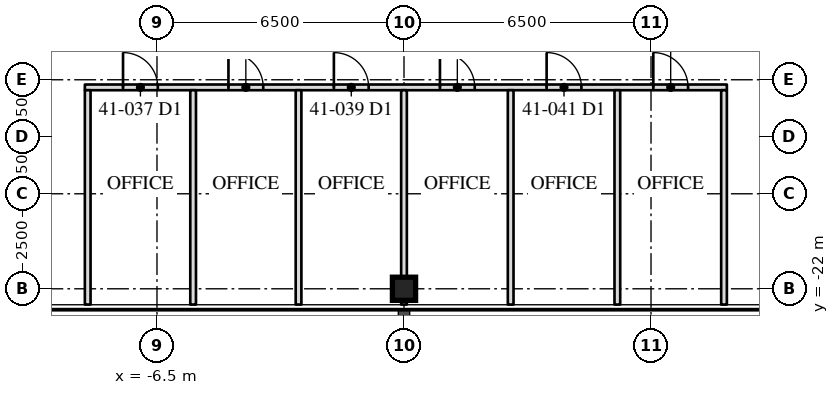
"""IFC4 building model, lengths in metres.
Left out: names, types, materials, properties, quantities, classifications, styles, units other than length and angle.
Written with IfcOpenShell. Run it as: python <this file> out.ifc"""

import sys

from ifc_helpers import new_model, si_unit, direction, frame, frame_2d, origin, origin_2d, place, context, subcontext, project, spatial, rectangle, hollow_rectangle, extrude, element, fill, save


model = new_model("IFC4")
c1 = context("Model", 3, precision=1e-05, world=origin(), true_north=direction((0.0, 1.0)))
c2 = subcontext(c1, "Body", "Model", "MODEL_VIEW")
j1 = project(units=[si_unit("LENGTHUNIT", "METRE"), si_unit("PLANEANGLEUNIT", "RADIAN")], contexts=[c1])
p1 = place(None, origin())
s1 = spatial("IfcSite", under=j1, at=p1, CompositionType="ELEMENT")
p2 = place(p1, origin())
s2 = spatial("IfcBuilding", under=s1, at=p2, CompositionType="ELEMENT")
p3 = place(p2, frame((0.0, 0.0, 174.6)))
s3 = spatial("IfcBuildingStorey", under=s2, at=p3, CompositionType="ELEMENT", Elevation=174.6)
p4 = place(p3, frame((0.0, -22.0, 0.0), z_axis=(0.0, 0.0, 1.0), x_axis=(1.0, 0.0, 0.0)))
e1 = element("IfcColumn", 1, at=p4, inside=s3, PredefinedType="COLUMN", context=c2, shape_type="SweptSolid", body=[
    extrude(hollow_rectangle(XDim=0.61, YDim=0.61, WallThickness=0.076, at=origin_2d()), origin(), (0.0, 0.0, 1.0), 4.1),
])
p5 = place(p3, frame((-8.398, -16.7, 0.0), z_axis=(0.0, 0.0, 1.0), x_axis=(1.0, 0.0, 0.0)))
e2 = element("IfcWall", 2, at=p5, inside=s3, PredefinedType="PARTITIONING", context=c2, shape_type="SweptSolid", body=[
    extrude(rectangle(XDim=16.894, YDim=0.15, at=frame_2d((8.447, 0.0))), origin(), (0.0, 0.0, 1.0), 3.91),
])
p6 = place(p5, frame((1.004, 0.0, 0.0)))
e3 = element("IfcOpeningElement", 3, at=p6, cuts=e2, PredefinedType="OPENING", context=c2, shape_type="SweptSolid", body=[
    extrude(rectangle(XDim=0.915, YDim=2.134, at=frame_2d((0.458, 1.067))), frame((0.0, 0.085, 0.0), z_axis=(0.0, -1.0, 0.0), x_axis=(1.0, 0.0, 0.0)), (0.0, 0.0, 1.0), 0.17),
])
p7 = place(p5, frame((3.779, 0.0, 0.0)))
e4 = element("IfcOpeningElement", 4, at=p7, cuts=e2, PredefinedType="OPENING", context=c2, shape_type="SweptSolid", body=[
    extrude(rectangle(XDim=0.915, YDim=2.134, at=frame_2d((0.458, 1.067))), frame((0.0, 0.085, 0.0), z_axis=(0.0, -1.0, 0.0), x_axis=(1.0, 0.0, 0.0)), (0.0, 0.0, 1.0), 0.17),
])
p8 = place(p5, frame((6.553, 0.0, 0.0)))
e5 = element("IfcOpeningElement", 5, at=p8, cuts=e2, PredefinedType="OPENING", context=c2, shape_type="SweptSolid", body=[
    extrude(rectangle(XDim=0.915, YDim=2.134, at=frame_2d((0.458, 1.067))), frame((0.0, 0.085, 0.0), z_axis=(0.0, -1.0, 0.0), x_axis=(1.0, 0.0, 0.0)), (0.0, 0.0, 1.0), 0.17),
])
p9 = place(p5, frame((9.344, 0.0, 0.0)))
e6 = element("IfcOpeningElement", 6, at=p9, cuts=e2, PredefinedType="OPENING", context=c2, shape_type="SweptSolid", body=[
    extrude(rectangle(XDim=0.915, YDim=2.134, at=frame_2d((0.458, 1.067))), frame((0.0, 0.085, 0.0), z_axis=(0.0, -1.0, 0.0), x_axis=(1.0, 0.0, 0.0)), (0.0, 0.0, 1.0), 0.17),
])
p10 = place(p5, frame((12.151, 0.0, 0.0)))
e7 = element("IfcOpeningElement", 7, at=p10, cuts=e2, PredefinedType="OPENING", context=c2, shape_type="SweptSolid", body=[
    extrude(rectangle(XDim=0.915, YDim=2.134, at=frame_2d((0.458, 1.067))), frame((0.0, 0.085, 0.0), z_axis=(0.0, -1.0, 0.0), x_axis=(1.0, 0.0, 0.0)), (0.0, 0.0, 1.0), 0.17),
])
p11 = place(p5, frame((14.958, 0.0, 0.0)))
e8 = element("IfcOpeningElement", 8, at=p11, cuts=e2, PredefinedType="OPENING", context=c2, shape_type="SweptSolid", body=[
    extrude(rectangle(XDim=0.915, YDim=2.134, at=frame_2d((0.458, 1.067))), frame((0.0, 0.085, 0.0), z_axis=(0.0, -1.0, 0.0), x_axis=(1.0, 0.0, 0.0)), (0.0, 0.0, 1.0), 0.17),
])
for number, where, z_axis, x_axis in (
    (9, (-8.323, -16.775, 0.0), (0.0, 0.0, 1.0), (0.0, -1.0, 0.0)),
    (10, (-5.549, -16.775, 0.0), (0.0, 0.0, 1.0), (0.0, -1.0, 0.0)),
    (11, (-2.775, -16.775, 0.0), (0.0, 0.0, 1.0), (0.0, -1.0, 0.0)),
):
    element("IfcWall", number, at=place(p3, frame(where, z_axis=z_axis, x_axis=x_axis)), inside=s3, PredefinedType="PARTITIONING", context=c2, shape_type="SweptSolid", body=[
        extrude(rectangle(XDim=5.64, YDim=0.15, at=frame_2d((2.82, 0.0))), origin(), (0.0, 0.0, 1.0), 3.91),
    ])
p12 = place(p3, frame((0.0, -16.775, 0.0), z_axis=(0.0, 0.0, 1.0), x_axis=(0.0, -1.0, 0.0)))
e12 = element("IfcWall", 12, at=p12, inside=s3, PredefinedType="PARTITIONING", context=c2, shape_type="SweptSolid", body=[
    extrude(rectangle(XDim=5.64, YDim=0.15, at=frame_2d((2.82, 0.0))), origin(), (0.0, 0.0, 1.0), 3.3),
])
for number, where, z_axis, x_axis in (
    (13, (2.807, -16.775, 0.0), (0.0, 0.0, 1.0), (0.0, -1.0, 0.0)),
    (14, (5.614, -16.775, 0.0), (0.0, 0.0, 1.0), (0.0, -1.0, 0.0)),
    (15, (8.421, -16.775, 0.0), (0.0, 0.0, 1.0), (0.0, -1.0, 0.0)),
):
    element("IfcWall", number, at=place(p3, frame(where, z_axis=z_axis, x_axis=x_axis)), inside=s3, PredefinedType="PARTITIONING", context=c2, shape_type="SweptSolid", body=[
        extrude(rectangle(XDim=5.64, YDim=0.15, at=frame_2d((2.82, 0.0))), origin(), (0.0, 0.0, 1.0), 3.91),
    ])
p13 = place(p6, origin())
e16 = element("IfcDoor", 16, at=p13, inside=s3, OperationType="SINGLE_SWING_LEFT", PredefinedType="DOOR", context=c2, shape_type="SweptSolid", body=[
    extrude(rectangle(XDim=0.915, YDim=2.134, at=frame_2d((0.458, 1.067))), frame((0.0, 0.025, 0.0), z_axis=(0.0, -1.0, 0.0), x_axis=(1.0, 0.0, 0.0)), (0.0, 0.0, 1.0), 0.05),
])
fill(e3, e16)
p14 = place(p7, origin())
e17 = element("IfcDoor", 17, at=p14, inside=s3, OperationType="SINGLE_SWING_LEFT", PredefinedType="DOOR", context=c2, shape_type="SweptSolid", body=[
    extrude(rectangle(XDim=0.915, YDim=2.134, at=frame_2d((0.458, 1.067))), frame((0.0, 0.025, 0.0), z_axis=(0.0, -1.0, 0.0), x_axis=(1.0, 0.0, 0.0)), (0.0, 0.0, 1.0), 0.05),
])
fill(e4, e17)
p15 = place(p8, origin())
e18 = element("IfcDoor", 18, at=p15, inside=s3, OperationType="SINGLE_SWING_LEFT", PredefinedType="DOOR", context=c2, shape_type="SweptSolid", body=[
    extrude(rectangle(XDim=0.915, YDim=2.134, at=frame_2d((0.458, 1.067))), frame((0.0, 0.025, 0.0), z_axis=(0.0, -1.0, 0.0), x_axis=(1.0, 0.0, 0.0)), (0.0, 0.0, 1.0), 0.05),
])
fill(e5, e18)
p16 = place(p9, origin())
e19 = element("IfcDoor", 19, at=p16, inside=s3, OperationType="SINGLE_SWING_LEFT", PredefinedType="DOOR", context=c2, shape_type="SweptSolid", body=[
    extrude(rectangle(XDim=0.915, YDim=2.134, at=frame_2d((0.458, 1.067))), frame((0.0, 0.025, 0.0), z_axis=(0.0, -1.0, 0.0), x_axis=(1.0, 0.0, 0.0)), (0.0, 0.0, 1.0), 0.05),
])
fill(e6, e19)
p17 = place(p10, origin())
e20 = element("IfcDoor", 20, at=p17, inside=s3, OperationType="SINGLE_SWING_LEFT", PredefinedType="DOOR", context=c2, shape_type="SweptSolid", body=[
    extrude(rectangle(XDim=0.915, YDim=2.134, at=frame_2d((0.458, 1.067))), frame((0.0, 0.025, 0.0), z_axis=(0.0, -1.0, 0.0), x_axis=(1.0, 0.0, 0.0)), (0.0, 0.0, 1.0), 0.05),
])
fill(e7, e20)
p18 = place(p11, origin())
e21 = element("IfcDoor", 21, at=p18, inside=s3, OperationType="SINGLE_SWING_LEFT", PredefinedType="DOOR", context=c2, shape_type="SweptSolid", body=[
    extrude(rectangle(XDim=0.915, YDim=2.134, at=frame_2d((0.458, 1.067))), frame((0.0, 0.025, 0.0), z_axis=(0.0, -1.0, 0.0), x_axis=(1.0, 0.0, 0.0)), (0.0, 0.0, 1.0), 0.05),
])
fill(e8, e21)
save(model, sys.argv[1])
